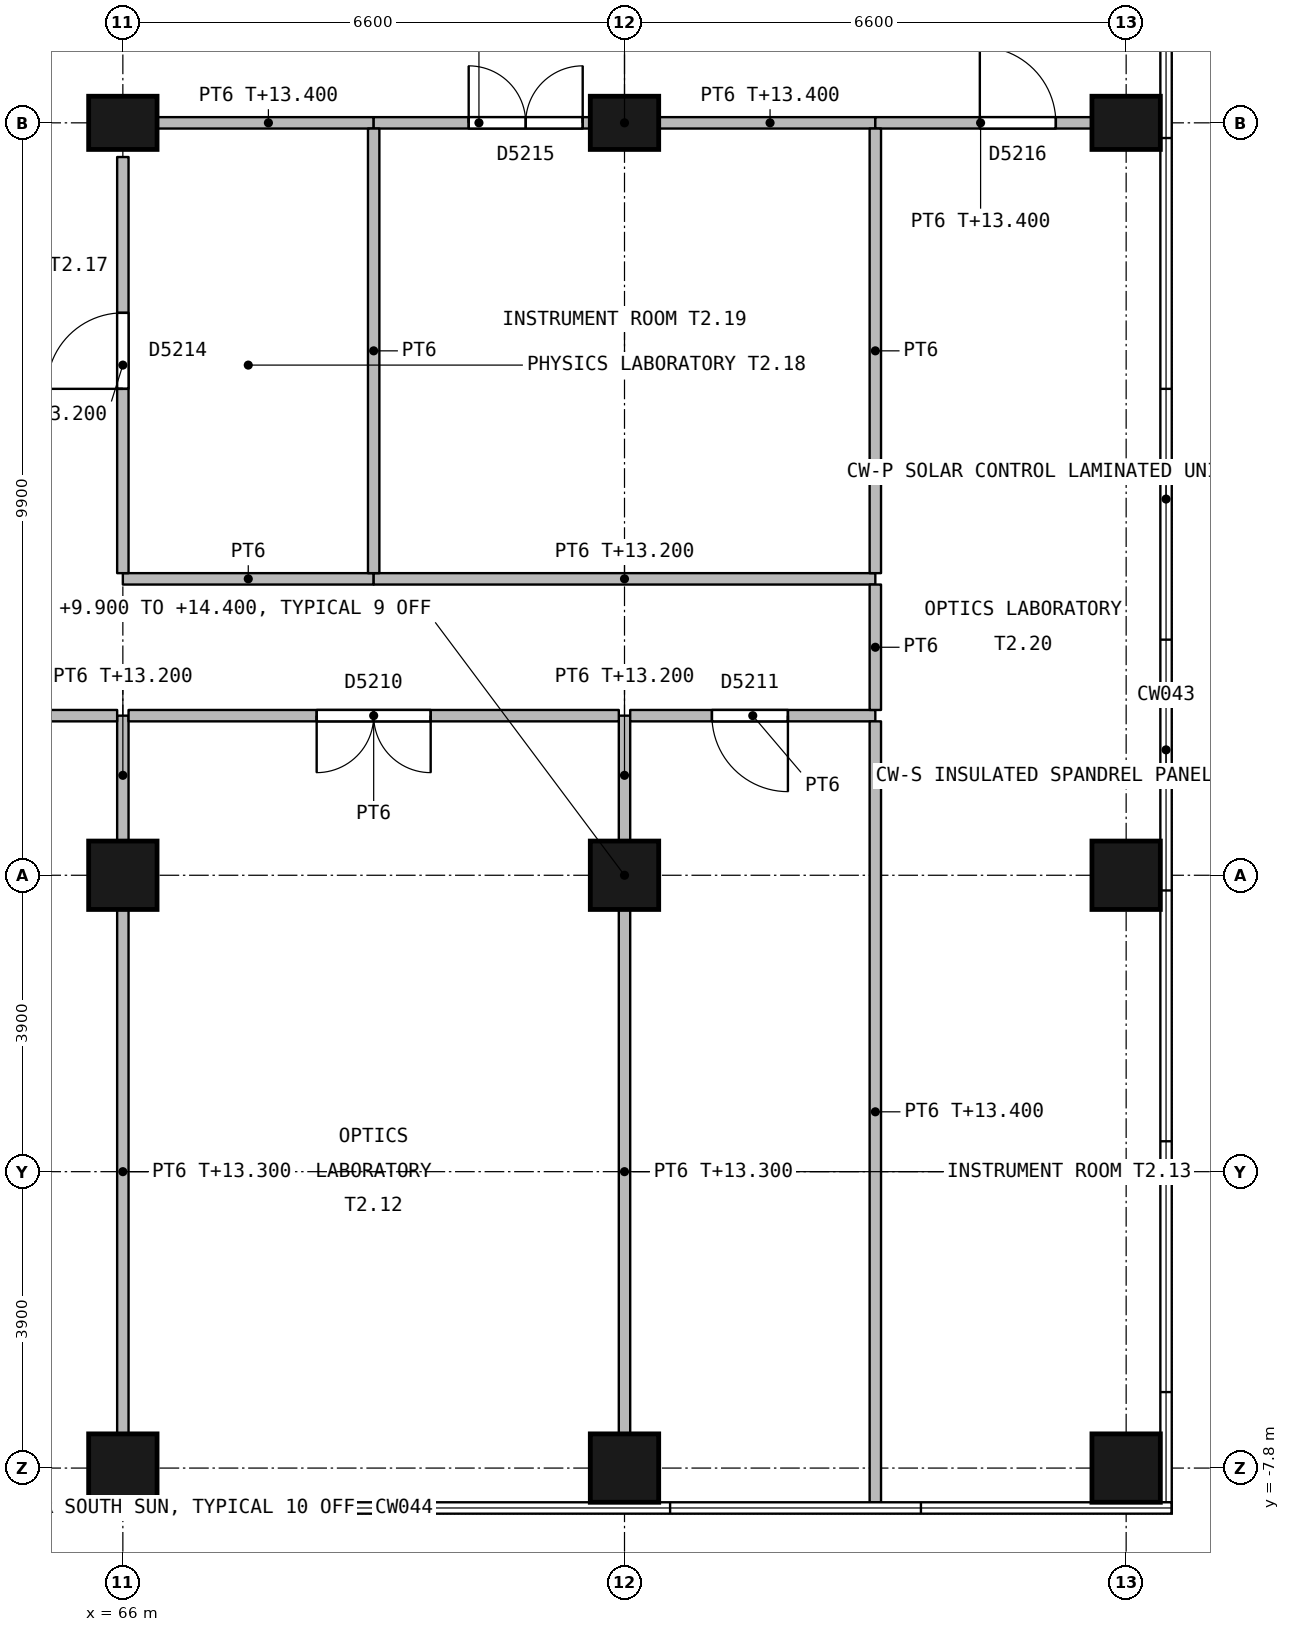
"""IFC4 building model, lengths in metres.
Left out: names, types, materials, properties, quantities, classifications, styles, units other than length and angle.
Written with IfcOpenShell. Run it as: python <this file> out.ifc"""

import sys

from ifc_helpers import new_model, si_unit, direction, frame, frame_2d, origin, origin_2d, place, context, subcontext, project, spatial, rectangle, extrude, element, fill, save


model = new_model("IFC4")
c1 = context("Model", 3, precision=1e-05, world=origin(), true_north=direction((0.0, 1.0)))
c2 = subcontext(c1, "Body", "Model", "MODEL_VIEW")
j1 = project(units=[si_unit("LENGTHUNIT", "METRE"), si_unit("PLANEANGLEUNIT", "RADIAN")], contexts=[c1])
p1 = place(None, origin())
s1 = spatial("IfcSite", under=j1, at=p1, CompositionType="ELEMENT")
p2 = place(p1, origin())
s2 = spatial("IfcBuilding", under=s1, at=p2, CompositionType="ELEMENT")
p3 = place(p2, frame((0.0, 0.0, 9.9)))
s3 = spatial("IfcBuildingStorey", under=s2, at=p3, CompositionType="ELEMENT", Elevation=9.9)
for number, where, z_axis, x_axis in (
    (1, (66.0, -7.8, 0.0), (0.0, 0.0, 1.0), (1.0, 0.0, 0.0)),
    (2, (66.0, 0.0, 0.0), (0.0, 0.0, 1.0), (1.0, 0.0, 0.0)),
):
    element("IfcColumn", number, at=place(p3, frame(where, z_axis=z_axis, x_axis=x_axis)), inside=s3, PredefinedType="COLUMN", context=c2, shape_type="SweptSolid", body=[
        extrude(rectangle(XDim=0.9, YDim=0.9, at=origin_2d()), origin(), (0.0, 0.0, 1.0), 4.5),
    ])
p4 = place(p3, frame((66.0, 9.9, 0.0), z_axis=(0.0, 0.0, 1.0), x_axis=(1.0, 0.0, 0.0)))
e3 = element("IfcColumn", 3, at=p4, inside=s3, PredefinedType="COLUMN", context=c2, shape_type="SweptSolid", body=[
    extrude(rectangle(XDim=0.9, YDim=0.7, at=origin_2d()), origin(), (0.0, 0.0, 1.0), 4.5),
])
for number, where, z_axis, x_axis in (
    (4, (72.6, -7.8, 0.0), (0.0, 0.0, 1.0), (1.0, 0.0, 0.0)),
    (5, (72.6, 0.0, 0.0), (0.0, 0.0, 1.0), (1.0, 0.0, 0.0)),
):
    element("IfcColumn", number, at=place(p3, frame(where, z_axis=z_axis, x_axis=x_axis)), inside=s3, PredefinedType="COLUMN", context=c2, shape_type="SweptSolid", body=[
        extrude(rectangle(XDim=0.9, YDim=0.9, at=origin_2d()), origin(), (0.0, 0.0, 1.0), 4.5),
    ])
p5 = place(p3, frame((72.6, 9.9, 0.0), z_axis=(0.0, 0.0, 1.0), x_axis=(1.0, 0.0, 0.0)))
e6 = element("IfcColumn", 6, at=p5, inside=s3, PredefinedType="COLUMN", context=c2, shape_type="SweptSolid", body=[
    extrude(rectangle(XDim=0.9, YDim=0.7, at=origin_2d()), origin(), (0.0, 0.0, 1.0), 4.5),
])
for number, where, z_axis, x_axis in (
    (7, (79.2, -7.8, 0.0), (0.0, 0.0, 1.0), (1.0, 0.0, 0.0)),
    (8, (79.2, 0.0, 0.0), (0.0, 0.0, 1.0), (1.0, 0.0, 0.0)),
):
    element("IfcColumn", number, at=place(p3, frame(where, z_axis=z_axis, x_axis=x_axis)), inside=s3, PredefinedType="COLUMN", context=c2, shape_type="SweptSolid", body=[
        extrude(rectangle(XDim=0.9, YDim=0.9, at=origin_2d()), origin(), (0.0, 0.0, 1.0), 4.5),
    ])
p6 = place(p3, frame((79.2, 9.9, 0.0), z_axis=(0.0, 0.0, 1.0), x_axis=(1.0, 0.0, 0.0)))
e9 = element("IfcColumn", 9, at=p6, inside=s3, PredefinedType="COLUMN", context=c2, shape_type="SweptSolid", body=[
    extrude(rectangle(XDim=0.9, YDim=0.7, at=origin_2d()), origin(), (0.0, 0.0, 1.0), 4.5),
])
p7 = place(p3, frame((66.45, 9.9, 0.0), z_axis=(0.0, 0.0, 1.0), x_axis=(1.0, 0.0, 0.0)))
e10 = element("IfcWall", 10, at=p7, inside=s3, PredefinedType="PARTITIONING", context=c2, shape_type="SweptSolid", body=[
    extrude(rectangle(XDim=2.85, YDim=0.15, at=frame_2d((1.425, 0.0))), origin(), (0.0, 0.0, 1.0), 3.5),
])
p8 = place(p3, frame((69.3, 9.9, 0.0), z_axis=(0.0, 0.0, 1.0), x_axis=(1.0, 0.0, 0.0)))
e11 = element("IfcWall", 11, at=p8, inside=s3, PredefinedType="PARTITIONING", context=c2, shape_type="SweptSolid", body=[
    extrude(rectangle(XDim=2.85, YDim=0.15, at=frame_2d((1.425, 0.0))), origin(), (0.0, 0.0, 1.0), 3.5),
])
p9 = place(p8, frame((1.25, 0.0, 0.0)))
e12 = element("IfcOpeningElement", 12, at=p9, cuts=e11, PredefinedType="OPENING", context=c2, shape_type="SweptSolid", body=[
    extrude(rectangle(XDim=1.5, YDim=2.1, at=frame_2d((0.75, 1.05))), frame((0.0, 0.085, 0.0), z_axis=(0.0, -1.0, 0.0), x_axis=(1.0, 0.0, 0.0)), (0.0, 0.0, 1.0), 0.17),
])
p10 = place(p3, frame((73.05, 9.9, 0.0), z_axis=(0.0, 0.0, 1.0), x_axis=(1.0, 0.0, 0.0)))
e13 = element("IfcWall", 13, at=p10, inside=s3, PredefinedType="PARTITIONING", context=c2, shape_type="SweptSolid", body=[
    extrude(rectangle(XDim=2.85, YDim=0.15, at=frame_2d((1.425, 0.0))), origin(), (0.0, 0.0, 1.0), 3.5),
])
p11 = place(p3, frame((75.9, 9.9, 0.0), z_axis=(0.0, 0.0, 1.0), x_axis=(1.0, 0.0, 0.0)))
e14 = element("IfcWall", 14, at=p11, inside=s3, PredefinedType="PARTITIONING", context=c2, shape_type="SweptSolid", body=[
    extrude(rectangle(XDim=2.85, YDim=0.15, at=frame_2d((1.425, 0.0))), origin(), (0.0, 0.0, 1.0), 3.5),
])
p12 = place(p11, frame((1.375, 0.0, 0.0)))
e15 = element("IfcOpeningElement", 15, at=p12, cuts=e14, PredefinedType="OPENING", context=c2, shape_type="SweptSolid", body=[
    extrude(rectangle(XDim=1.0, YDim=2.1, at=frame_2d((0.5, 1.05))), frame((0.0, 0.085, 0.0), z_axis=(0.0, -1.0, 0.0), x_axis=(1.0, 0.0, 0.0)), (0.0, 0.0, 1.0), 0.17),
])
p13 = place(p3, frame((66.0, -7.35, 0.0), z_axis=(0.0, 0.0, 1.0), x_axis=(0.0, 1.0, 0.0)))
e16 = element("IfcWall", 16, at=p13, inside=s3, PredefinedType="PARTITIONING", context=c2, shape_type="SweptSolid", body=[
    extrude(rectangle(XDim=6.9, YDim=0.15, at=frame_2d((3.45, 0.0))), origin(), (0.0, 0.0, 1.0), 3.4),
])
p14 = place(p3, frame((66.0, 0.45, 0.0), z_axis=(0.0, 0.0, 1.0), x_axis=(0.0, 1.0, 0.0)))
e17 = element("IfcWall", 17, at=p14, inside=s3, PredefinedType="PARTITIONING", context=c2, shape_type="SweptSolid", body=[
    extrude(rectangle(XDim=1.65, YDim=0.15, at=frame_2d((0.825, 0.0))), origin(), (0.0, 0.0, 1.0), 3.3),
])
p15 = place(p3, frame((65.925, 2.1, 0.0), z_axis=(0.0, 0.0, 1.0), x_axis=(-1.0, 0.0, 0.0)))
e18 = element("IfcWall", 18, at=p15, inside=s3, PredefinedType="PARTITIONING", context=c2, shape_type="SweptSolid", body=[
    extrude(rectangle(XDim=6.525, YDim=0.15, at=frame_2d((3.262, 0.0))), origin(), (0.0, 0.0, 1.0), 4.2),
])
p16 = place(p15, frame((2.475, 0.0, 0.0)))
e19 = element("IfcOpeningElement", 19, at=p16, cuts=e18, PredefinedType="OPENING", context=c2, shape_type="SweptSolid", body=[
    extrude(rectangle(XDim=1.5, YDim=2.1, at=frame_2d((0.75, 1.05))), frame((0.0, 0.085, 0.0), z_axis=(0.0, -1.0, 0.0), x_axis=(1.0, 0.0, 0.0)), (0.0, 0.0, 1.0), 0.17),
])
p17 = place(p3, frame((72.6, -7.35, 0.0), z_axis=(0.0, 0.0, 1.0), x_axis=(0.0, 1.0, 0.0)))
e20 = element("IfcWall", 20, at=p17, inside=s3, PredefinedType="PARTITIONING", context=c2, shape_type="SweptSolid", body=[
    extrude(rectangle(XDim=6.9, YDim=0.15, at=frame_2d((3.45, 0.0))), origin(), (0.0, 0.0, 1.0), 3.4),
])
p18 = place(p3, frame((72.6, 0.45, 0.0), z_axis=(0.0, 0.0, 1.0), x_axis=(0.0, 1.0, 0.0)))
e21 = element("IfcWall", 21, at=p18, inside=s3, PredefinedType="PARTITIONING", context=c2, shape_type="SweptSolid", body=[
    extrude(rectangle(XDim=1.65, YDim=0.15, at=frame_2d((0.825, 0.0))), origin(), (0.0, 0.0, 1.0), 3.3),
])
p19 = place(p3, frame((72.525, 2.1, 0.0), z_axis=(0.0, 0.0, 1.0), x_axis=(-1.0, 0.0, 0.0)))
e22 = element("IfcWall", 22, at=p19, inside=s3, PredefinedType="PARTITIONING", context=c2, shape_type="SweptSolid", body=[
    extrude(rectangle(XDim=6.45, YDim=0.15, at=frame_2d((3.225, 0.0))), origin(), (0.0, 0.0, 1.0), 4.2),
])
p20 = place(p19, frame((2.475, 0.0, 0.0)))
e23 = element("IfcOpeningElement", 23, at=p20, cuts=e22, PredefinedType="OPENING", context=c2, shape_type="SweptSolid", body=[
    extrude(rectangle(XDim=1.5, YDim=2.1, at=frame_2d((0.75, 1.05))), frame((0.0, 0.085, 0.0), z_axis=(0.0, -1.0, 0.0), x_axis=(1.0, 0.0, 0.0)), (0.0, 0.0, 1.0), 0.17),
])
p21 = place(p3, frame((75.9, 2.1, 0.0), z_axis=(0.0, 0.0, 1.0), x_axis=(-1.0, 0.0, 0.0)))
e24 = element("IfcWall", 24, at=p21, inside=s3, PredefinedType="PARTITIONING", context=c2, shape_type="SweptSolid", body=[
    extrude(rectangle(XDim=3.225, YDim=0.15, at=frame_2d((1.612, 0.0))), origin(), (0.0, 0.0, 1.0), 4.2),
])
p22 = place(p21, frame((1.15, 0.0, 0.0)))
e25 = element("IfcOpeningElement", 25, at=p22, cuts=e24, PredefinedType="OPENING", context=c2, shape_type="SweptSolid", body=[
    extrude(rectangle(XDim=1.0, YDim=2.1, at=frame_2d((0.5, 1.05))), frame((0.0, 0.085, 0.0), z_axis=(0.0, -1.0, 0.0), x_axis=(1.0, 0.0, 0.0)), (0.0, 0.0, 1.0), 0.17),
])
p23 = place(p3, frame((75.9, -8.25, 0.0), z_axis=(0.0, 0.0, 1.0), x_axis=(0.0, 1.0, 0.0)))
e26 = element("IfcWall", 26, at=p23, inside=s3, PredefinedType="PARTITIONING", context=c2, shape_type="SweptSolid", body=[
    extrude(rectangle(XDim=10.275, YDim=0.15, at=frame_2d((5.137, 0.0))), origin(), (0.0, 0.0, 1.0), 3.5),
])
p24 = place(p3, frame((69.3, 3.9, 0.0), z_axis=(0.0, 0.0, 1.0), x_axis=(-1.0, 0.0, 0.0)))
e27 = element("IfcWall", 27, at=p24, inside=s3, PredefinedType="PARTITIONING", context=c2, shape_type="SweptSolid", body=[
    extrude(rectangle(XDim=3.3, YDim=0.15, at=frame_2d((1.65, 0.0))), origin(), (0.0, 0.0, 1.0), 4.2),
])
p25 = place(p3, frame((75.9, 3.9, 0.0), z_axis=(0.0, 0.0, 1.0), x_axis=(-1.0, 0.0, 0.0)))
e28 = element("IfcWall", 28, at=p25, inside=s3, PredefinedType="PARTITIONING", context=c2, shape_type="SweptSolid", body=[
    extrude(rectangle(XDim=6.6, YDim=0.15, at=frame_2d((3.3, 0.0))), origin(), (0.0, 0.0, 1.0), 3.3),
])
p26 = place(p3, frame((75.9, 2.175, 0.0), z_axis=(0.0, 0.0, 1.0), x_axis=(0.0, 1.0, 0.0)))
e29 = element("IfcWall", 29, at=p26, inside=s3, PredefinedType="PARTITIONING", context=c2, shape_type="SweptSolid", body=[
    extrude(rectangle(XDim=1.65, YDim=0.15, at=frame_2d((0.825, 0.0))), origin(), (0.0, 0.0, 1.0), 4.2),
])
p27 = place(p3, frame((66.0, 3.975, 0.0), z_axis=(0.0, 0.0, 1.0), x_axis=(0.0, 1.0, 0.0)))
e30 = element("IfcWall", 30, at=p27, inside=s3, PredefinedType="PARTITIONING", context=c2, shape_type="SweptSolid", body=[
    extrude(rectangle(XDim=5.475, YDim=0.15, at=frame_2d((2.737, 0.0))), origin(), (0.0, 0.0, 1.0), 3.3),
])
p28 = place(p27, frame((2.425, 0.0, 0.0)))
e31 = element("IfcOpeningElement", 31, at=p28, cuts=e30, PredefinedType="OPENING", context=c2, shape_type="SweptSolid", body=[
    extrude(rectangle(XDim=1.0, YDim=2.1, at=frame_2d((0.5, 1.05))), frame((0.0, 0.085, 0.0), z_axis=(0.0, -1.0, 0.0), x_axis=(1.0, 0.0, 0.0)), (0.0, 0.0, 1.0), 0.17),
])
for number, where, z_axis, x_axis in (
    (32, (69.3, 3.975, 0.0), (0.0, 0.0, 1.0), (0.0, 1.0, 0.0)),
    (33, (75.9, 3.975, 0.0), (0.0, 0.0, 1.0), (0.0, 1.0, 0.0)),
):
    element("IfcWall", number, at=place(p3, frame(where, z_axis=z_axis, x_axis=x_axis)), inside=s3, PredefinedType="PARTITIONING", context=c2, shape_type="SweptSolid", body=[
        extrude(rectangle(XDim=5.85, YDim=0.15, at=frame_2d((2.925, 0.0))), origin(), (0.0, 0.0, 1.0), 4.2),
    ])
p29 = place(p20, origin())
e34 = element("IfcDoor", 34, at=p29, inside=s3, OperationType="DOUBLE_DOOR_SINGLE_SWING", PredefinedType="DOOR", context=c2, shape_type="SweptSolid", body=[
    extrude(rectangle(XDim=1.5, YDim=2.1, at=frame_2d((0.75, 1.05))), frame((0.0, 0.027, 0.0), z_axis=(0.0, -1.0, 0.0), x_axis=(1.0, 0.0, 0.0)), (0.0, 0.0, 1.0), 0.054),
])
fill(e23, e34)
p30 = place(p22, origin())
e35 = element("IfcDoor", 35, at=p30, inside=s3, OperationType="SINGLE_SWING_LEFT", PredefinedType="DOOR", context=c2, shape_type="SweptSolid", body=[
    extrude(rectangle(XDim=1.0, YDim=2.1, at=frame_2d((0.5, 1.05))), frame((0.0, 0.027, 0.0), z_axis=(0.0, -1.0, 0.0), x_axis=(1.0, 0.0, 0.0)), (0.0, 0.0, 1.0), 0.054),
])
fill(e25, e35)
p31 = place(p28, origin())
e36 = element("IfcDoor", 36, at=p31, inside=s3, OperationType="SINGLE_SWING_LEFT", PredefinedType="DOOR", context=c2, shape_type="SweptSolid", body=[
    extrude(rectangle(XDim=1.0, YDim=2.1, at=frame_2d((0.5, 1.05))), frame((0.0, 0.027, 0.0), z_axis=(0.0, -1.0, 0.0), x_axis=(1.0, 0.0, 0.0)), (0.0, 0.0, 1.0), 0.054),
])
fill(e31, e36)
p32 = place(p9, origin())
e37 = element("IfcDoor", 37, at=p32, inside=s3, OperationType="DOUBLE_DOOR_SINGLE_SWING", PredefinedType="DOOR", context=c2, shape_type="SweptSolid", body=[
    extrude(rectangle(XDim=1.5, YDim=2.1, at=frame_2d((0.75, 1.05))), frame((0.0, 0.027, 0.0), z_axis=(0.0, -1.0, 0.0), x_axis=(1.0, 0.0, 0.0)), (0.0, 0.0, 1.0), 0.054),
])
fill(e12, e37)
p33 = place(p12, origin())
e38 = element("IfcDoor", 38, at=p33, inside=s3, OperationType="SINGLE_SWING_LEFT", PredefinedType="DOOR", context=c2, shape_type="SweptSolid", body=[
    extrude(rectangle(XDim=1.0, YDim=2.1, at=frame_2d((0.5, 1.05))), frame((0.0, 0.027, 0.0), z_axis=(0.0, -1.0, 0.0), x_axis=(1.0, 0.0, 0.0)), (0.0, 0.0, 1.0), 0.054),
])
fill(e15, e38)
save(model, sys.argv[1])
